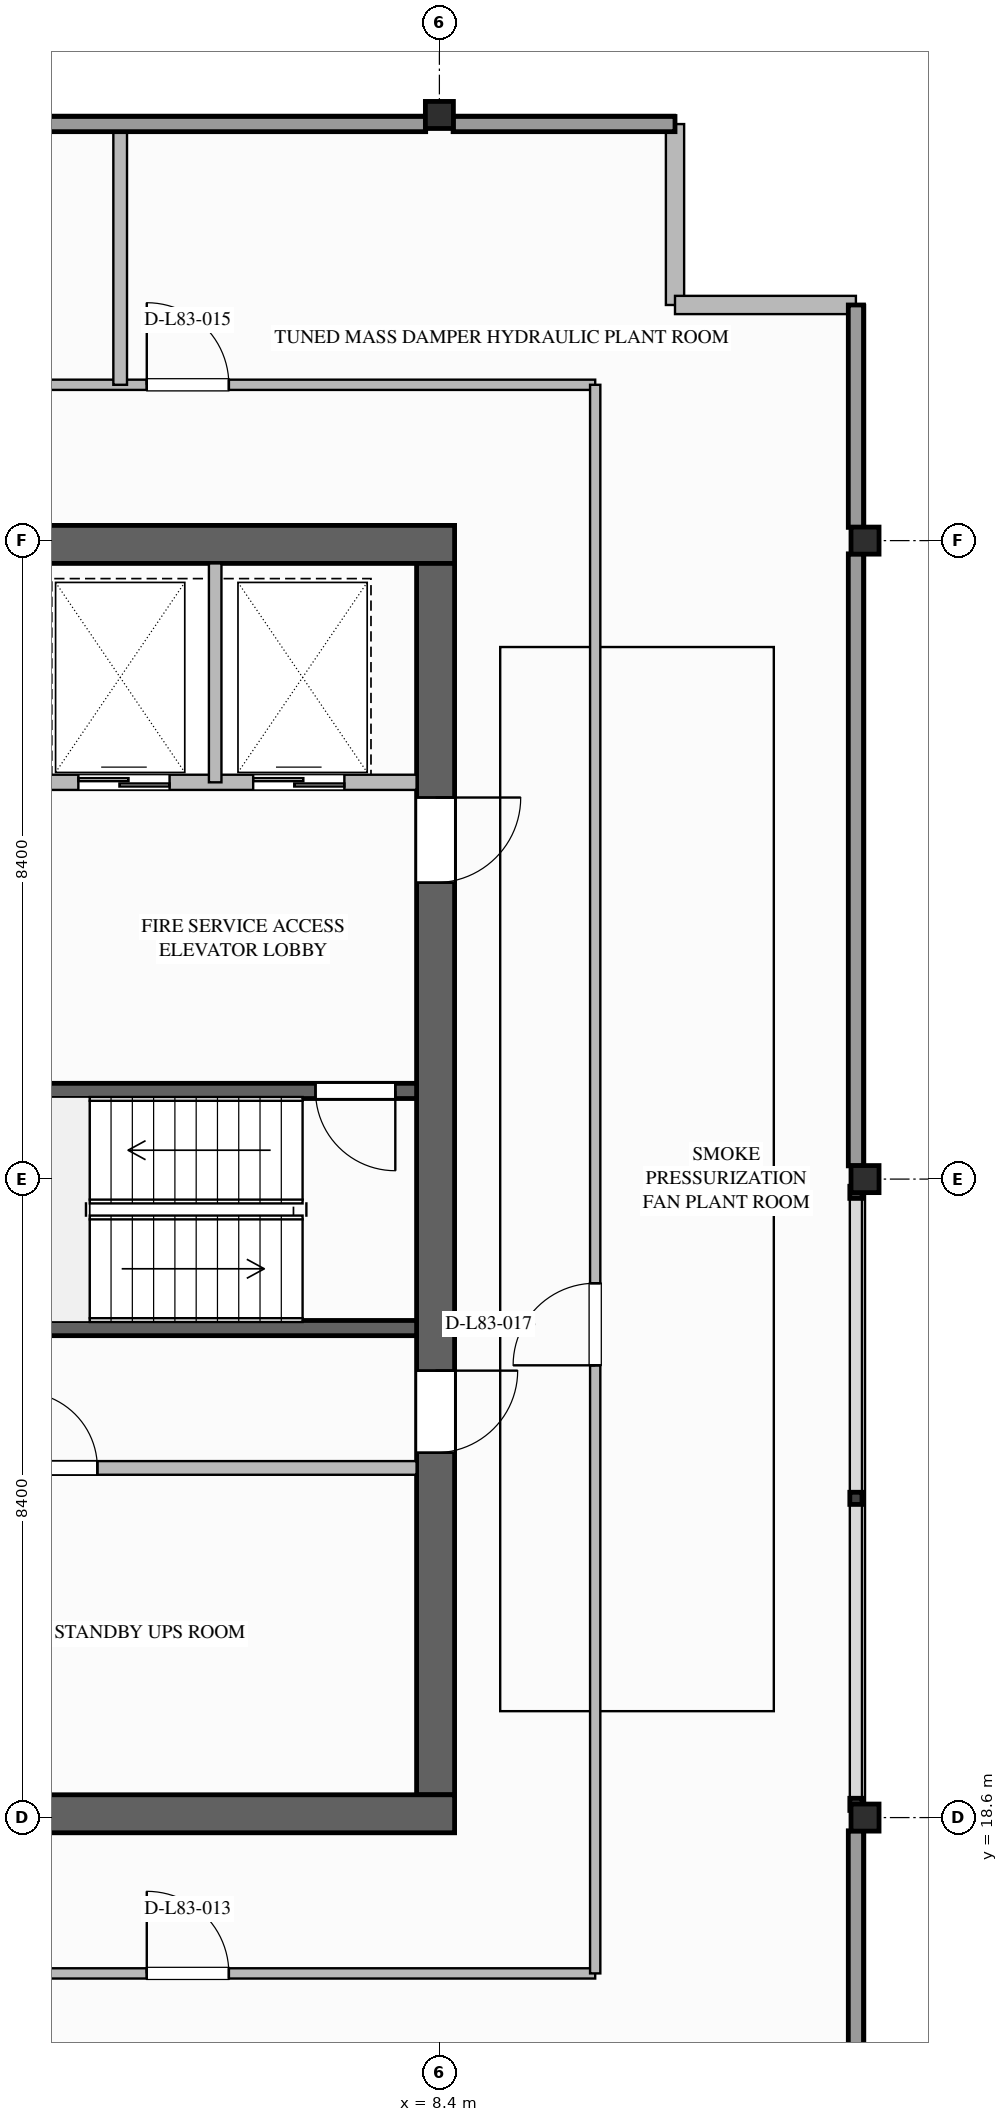
"""IFC4 building model, lengths in metres.
Left out: names, types, materials, properties, quantities, classifications, styles, units other than length and angle.
Written with IfcOpenShell. Run it as: python <this file> out.ifc"""

import sys

from ifc_helpers import new_model, si_unit, direction, frame, frame_2d, origin, origin_2d, place, context, subcontext, project, spatial, rectangle, i_section, extrude, element, fill, save


model = new_model("IFC4")
c1 = context("Model", 3, precision=1e-05, world=origin(), true_north=direction((0.0, 1.0)))
c2 = subcontext(c1, "Body", "Model", "MODEL_VIEW")
j1 = project(units=[si_unit("LENGTHUNIT", "METRE"), si_unit("PLANEANGLEUNIT", "RADIAN")], contexts=[c1])
p1 = place(None, origin())
s1 = spatial("IfcSite", under=j1, at=p1, CompositionType="ELEMENT")
p2 = place(p1, origin())
s2 = spatial("IfcBuilding", under=s1, at=p2, CompositionType="ELEMENT")
p3 = place(p2, frame((0.0, 0.0, 319.4)))
s3 = spatial("IfcBuildingStorey", under=s2, at=p3, CompositionType="ELEMENT", Elevation=319.4)
p4 = place(p3, frame((-8.6, 35.35, 0.0), z_axis=(0.0, 0.0, 1.0), x_axis=(1.0, 0.0, 0.0)))
e1 = element("IfcWall", 1, at=p4, inside=s3, PredefinedType="SHEAR", context=c2, shape_type="SweptSolid", body=[
    extrude(rectangle(XDim=17.2, YDim=0.5, at=frame_2d((8.6, 0.0))), origin(), (0.0, 0.0, 1.0), 3.8),
])
p5 = place(p3, frame((8.35, 35.1, 0.0), z_axis=(0.0, 0.0, 1.0), x_axis=(0.0, -1.0, 0.0)))
e2 = element("IfcWall", 2, at=p5, inside=s3, PredefinedType="SHEAR", context=c2, shape_type="SweptSolid", body=[
    extrude(rectangle(XDim=16.2, YDim=0.5, at=frame_2d((8.1, 0.0))), origin(), (0.0, 0.0, 1.0), 3.8),
])
p6 = place(p5, frame((3.08, 0.0, 0.0)))
e3 = element("IfcOpeningElement", 3, at=p6, cuts=e2, PredefinedType="OPENING", context=c2, shape_type="SweptSolid", body=[
    extrude(rectangle(XDim=1.12, YDim=2.1, at=frame_2d((0.56, 1.05))), frame((0.0, 0.26, 0.0), z_axis=(0.0, -1.0, 0.0), x_axis=(1.0, 0.0, 0.0)), (0.0, 0.0, 1.0), 0.52),
])
p7 = place(p5, frame((10.62, 0.0, 0.0)))
e4 = element("IfcOpeningElement", 4, at=p7, cuts=e2, PredefinedType="OPENING", context=c2, shape_type="SweptSolid", body=[
    extrude(rectangle(XDim=1.08, YDim=2.04, at=frame_2d((0.54, 1.02))), frame((0.0, 0.26, 0.0), z_axis=(0.0, -1.0, 0.0), x_axis=(1.0, 0.0, 0.0)), (0.0, 0.0, 1.0), 0.52),
])
p8 = place(p3, frame((8.6, 18.65, 0.0), z_axis=(0.0, 0.0, 1.0), x_axis=(-1.0, 0.0, 0.0)))
e5 = element("IfcWall", 5, at=p8, inside=s3, PredefinedType="SHEAR", context=c2, shape_type="SweptSolid", body=[
    extrude(rectangle(XDim=17.2, YDim=0.5, at=frame_2d((8.6, 0.0))), origin(), (0.0, 0.0, 1.0), 3.8),
])
for number, where, z_axis, x_axis in (
    (6, (14.0, 18.6, 0.0), (0.0, 0.0, 1.0), (1.0, 0.0, 0.0)),
    (7, (14.0, 27.0, 0.0), (0.0, 0.0, 1.0), (1.0, 0.0, 0.0)),
    (8, (14.0, 35.4, 0.0), (0.0, 0.0, 1.0), (1.0, 0.0, 0.0)),
    (9, (8.4, 41.0, 0.0), (0.0, 0.0, 1.0), (1.0, 0.0, 0.0)),
):
    element("IfcColumn", number, at=place(p3, frame(where, z_axis=z_axis, x_axis=x_axis)), inside=s3, PredefinedType="COLUMN", context=c2, shape_type="SweptSolid", body=[
        extrude(i_section(OverallWidth=0.369, OverallDepth=0.356, WebThickness=0.011, FlangeThickness=0.018, FilletRadius=0.025, at=origin_2d()), origin(), (0.0, 0.0, 1.0), 3.797),
    ])
for number, where, z_axis, x_axis in (
    (10, (11.5, 40.88, 0.0), (0.0, 0.0, 1.0), (0.0, -1.0, 0.0)),
    (11, (11.5, 38.5, 0.0), (0.0, 0.0, 1.0), (1.0, 0.0, 0.0)),
):
    element("IfcWall", number, at=place(p3, frame(where, z_axis=z_axis, x_axis=x_axis)), inside=s3, PredefinedType="STANDARD", context=c2, shape_type="SweptSolid", body=[
        extrude(rectangle(XDim=2.38, YDim=0.24, at=frame_2d((1.19, 0.0))), origin(), (0.0, 0.0, 1.0), 3.48),
    ])
p9 = place(p3, frame((0.0, 25.04, 0.0), z_axis=(0.0, 0.0, 1.0), x_axis=(1.0, 0.0, 0.0)))
e12 = element("IfcWall", 12, at=p9, inside=s3, PredefinedType="SOLIDWALL", context=c2, shape_type="SweptSolid", body=[
    extrude(rectangle(XDim=8.1, YDim=0.2, at=frame_2d((4.05, 0.0))), origin(), (0.0, 0.0, 1.0), 3.48),
])
p10 = place(p3, frame((8.1, 28.16, 0.0), z_axis=(0.0, 0.0, 1.0), x_axis=(-1.0, 0.0, 0.0)))
e13 = element("IfcWall", 13, at=p10, inside=s3, PredefinedType="SOLIDWALL", context=c2, shape_type="SweptSolid", body=[
    extrude(rectangle(XDim=8.1, YDim=0.2, at=frame_2d((4.05, 0.0))), origin(), (0.0, 0.0, 1.0), 3.48),
])
p11 = place(p10, frame((0.28, 0.0, 0.0)))
e14 = element("IfcOpeningElement", 14, at=p11, cuts=e13, PredefinedType="OPENING", context=c2, shape_type="SweptSolid", body=[
    extrude(rectangle(XDim=1.05, YDim=2.1, at=frame_2d((0.525, 1.05))), frame((0.0, 0.11, 0.0), z_axis=(0.0, -1.0, 0.0), x_axis=(1.0, 0.0, 0.0)), (0.0, 0.0, 1.0), 0.22),
])
p12 = place(p3, frame((3.1, 32.22, 0.0), z_axis=(0.0, 0.0, 1.0), x_axis=(1.0, 0.0, 0.0)))
e15 = element("IfcWall", 15, at=p12, inside=s3, PredefinedType="SOLIDWALL", context=c2, shape_type="SweptSolid", body=[
    extrude(rectangle(XDim=5.0, YDim=0.2, at=frame_2d((2.5, 0.0))), origin(), (0.0, 0.0, 1.0), 3.48),
])
p13 = place(p12, frame((0.55, 0.0, 0.0)))
e16 = element("IfcOpeningElement", 16, at=p13, cuts=e15, PredefinedType="OPENING", context=c2, shape_type="SweptSolid", body=[
    extrude(rectangle(XDim=1.2, YDim=2.2, at=frame_2d((0.6, 1.1))), frame((0.0, 0.11, 0.0), z_axis=(0.0, -1.0, 0.0), x_axis=(1.0, 0.0, 0.0)), (0.0, 0.0, 1.0), 0.22),
])
p14 = place(p12, frame((2.85, 0.0, 0.0)))
e17 = element("IfcOpeningElement", 17, at=p14, cuts=e15, PredefinedType="OPENING", context=c2, shape_type="SweptSolid", body=[
    extrude(rectangle(XDim=1.2, YDim=2.2, at=frame_2d((0.6, 1.1))), frame((0.0, 0.11, 0.0), z_axis=(0.0, -1.0, 0.0), x_axis=(1.0, 0.0, 0.0)), (0.0, 0.0, 1.0), 0.22),
])
p15 = place(p3, frame((5.45, 32.22, 0.0), z_axis=(0.0, 0.0, 1.0), x_axis=(0.0, 1.0, 0.0)))
e18 = element("IfcWall", 18, at=p15, inside=s3, PredefinedType="PARTITIONING", context=c2, shape_type="SweptSolid", body=[
    extrude(rectangle(XDim=2.88, YDim=0.165, at=frame_2d((1.44, 0.0))), origin(), (0.0, 0.0, 1.0), 3.48),
])
p16 = place(p3, frame((-8.1, 23.2, 0.0), z_axis=(0.0, 0.0, 1.0), x_axis=(1.0, 0.0, 0.0)))
e19 = element("IfcWall", 19, at=p16, inside=s3, PredefinedType="SOLIDWALL", context=c2, shape_type="SweptSolid", body=[
    extrude(rectangle(XDim=16.2, YDim=0.18, at=frame_2d((8.1, 0.0))), origin(), (0.0, 0.0, 1.0), 3.48),
])
p17 = place(p16, frame((2.5, 0.0, 0.0)))
e20 = element("IfcOpeningElement", 20, at=p17, cuts=e19, PredefinedType="OPENING", context=c2, shape_type="SweptSolid", body=[
    extrude(rectangle(XDim=1.0, YDim=2.1, at=frame_2d((0.5, 1.05))), frame((0.0, 0.1, 0.0), z_axis=(0.0, -1.0, 0.0), x_axis=(1.0, 0.0, 0.0)), (0.0, 0.0, 1.0), 0.2),
])
p18 = place(p16, frame((11.0, 0.0, 0.0)))
e21 = element("IfcOpeningElement", 21, at=p18, cuts=e19, PredefinedType="OPENING", context=c2, shape_type="SweptSolid", body=[
    extrude(rectangle(XDim=1.0, YDim=2.1, at=frame_2d((0.5, 1.05))), frame((0.0, 0.1, 0.0), z_axis=(0.0, -1.0, 0.0), x_axis=(1.0, 0.0, 0.0)), (0.0, 0.0, 1.0), 0.2),
])
p19 = place(p3, frame((-10.45, 16.55, 0.0), z_axis=(0.0, 0.0, 1.0), x_axis=(1.0, 0.0, 0.0)))
e22 = element("IfcWall", 22, at=p19, inside=s3, PredefinedType="PARTITIONING", context=c2, shape_type="SweptSolid", body=[
    extrude(rectangle(XDim=20.9, YDim=0.135, at=frame_2d((10.45, 0.0))), origin(), (0.0, 0.0, 1.0), 3.48),
])
p20 = place(p19, frame((3.0, 0.0, 0.0)))
e23 = element("IfcOpeningElement", 23, at=p20, cuts=e22, PredefinedType="OPENING", context=c2, shape_type="SweptSolid", body=[
    extrude(rectangle(XDim=1.08, YDim=2.04, at=frame_2d((0.54, 1.02))), frame((0.0, 0.077, 0.0), z_axis=(0.0, -1.0, 0.0), x_axis=(1.0, 0.0, 0.0)), (0.0, 0.0, 1.0), 0.155),
])
p21 = place(p19, frame((15.0, 0.0, 0.0)))
e24 = element("IfcOpeningElement", 24, at=p21, cuts=e22, PredefinedType="OPENING", context=c2, shape_type="SweptSolid", body=[
    extrude(rectangle(XDim=1.08, YDim=2.04, at=frame_2d((0.54, 1.02))), frame((0.0, 0.077, 0.0), z_axis=(0.0, -1.0, 0.0), x_axis=(1.0, 0.0, 0.0)), (0.0, 0.0, 1.0), 0.155),
])
p22 = place(p3, frame((-10.45, 37.45, 0.0), z_axis=(0.0, 0.0, 1.0), x_axis=(1.0, 0.0, 0.0)))
e25 = element("IfcWall", 25, at=p22, inside=s3, PredefinedType="PARTITIONING", context=c2, shape_type="SweptSolid", body=[
    extrude(rectangle(XDim=20.9, YDim=0.135, at=frame_2d((10.45, 0.0))), origin(), (0.0, 0.0, 1.0), 3.48),
])
p23 = place(p22, frame((3.0, 0.0, 0.0)))
e26 = element("IfcOpeningElement", 26, at=p23, cuts=e25, PredefinedType="OPENING", context=c2, shape_type="SweptSolid", body=[
    extrude(rectangle(XDim=1.08, YDim=2.04, at=frame_2d((0.54, 1.02))), frame((0.0, 0.077, 0.0), z_axis=(0.0, -1.0, 0.0), x_axis=(1.0, 0.0, 0.0)), (0.0, 0.0, 1.0), 0.155),
])
p24 = place(p22, frame((15.0, 0.0, 0.0)))
e27 = element("IfcOpeningElement", 27, at=p24, cuts=e25, PredefinedType="OPENING", context=c2, shape_type="SweptSolid", body=[
    extrude(rectangle(XDim=1.08, YDim=2.04, at=frame_2d((0.54, 1.02))), frame((0.0, 0.077, 0.0), z_axis=(0.0, -1.0, 0.0), x_axis=(1.0, 0.0, 0.0)), (0.0, 0.0, 1.0), 0.155),
])
p25 = place(p3, frame((10.45, 16.55, 0.0), z_axis=(0.0, 0.0, 1.0), x_axis=(0.0, 1.0, 0.0)))
e28 = element("IfcWall", 28, at=p25, inside=s3, PredefinedType="PARTITIONING", context=c2, shape_type="SweptSolid", body=[
    extrude(rectangle(XDim=20.9, YDim=0.135, at=frame_2d((10.45, 0.0))), origin(), (0.0, 0.0, 1.0), 3.48),
])
p26 = place(p25, frame((8.0, 0.0, 0.0)))
e29 = element("IfcOpeningElement", 29, at=p26, cuts=e28, PredefinedType="OPENING", context=c2, shape_type="SweptSolid", body=[
    extrude(rectangle(XDim=1.08, YDim=2.04, at=frame_2d((0.54, 1.02))), frame((0.0, 0.077, 0.0), z_axis=(0.0, -1.0, 0.0), x_axis=(1.0, 0.0, 0.0)), (0.0, 0.0, 1.0), 0.155),
])
p27 = place(p3, frame((4.2, 37.45, 0.0), z_axis=(0.0, 0.0, 1.0), x_axis=(0.0, 1.0, 0.0)))
e30 = element("IfcWall", 30, at=p27, inside=s3, PredefinedType="SOLIDWALL", context=c2, shape_type="SweptSolid", body=[
    extrude(rectangle(XDim=3.43, YDim=0.18, at=frame_2d((1.715, 0.0))), origin(), (0.0, 0.0, 1.0), 3.48),
])
p28 = place(p11, origin())
e31 = element("IfcDoor", 31, at=p28, inside=s3, OperationType="SINGLE_SWING_LEFT", PredefinedType="DOOR", context=c2, shape_type="SweptSolid", body=[
    extrude(rectangle(XDim=1.05, YDim=2.1, at=frame_2d((0.525, 1.05))), frame((0.0, 0.025, 0.0), z_axis=(0.0, -1.0, 0.0), x_axis=(1.0, 0.0, 0.0)), (0.0, 0.0, 1.0), 0.05),
])
fill(e14, e31)
p29 = place(p13, origin())
e32 = element("IfcDoor", 32, at=p29, inside=s3, OperationType="SLIDING_TO_LEFT", PredefinedType="DOOR", context=c2, shape_type="SweptSolid", body=[
    extrude(rectangle(XDim=1.2, YDim=2.2, at=frame_2d((0.6, 1.1))), frame((0.0, 0.025, 0.0), z_axis=(0.0, -1.0, 0.0), x_axis=(1.0, 0.0, 0.0)), (0.0, 0.0, 1.0), 0.05),
])
fill(e16, e32)
p30 = place(p14, origin())
e33 = element("IfcDoor", 33, at=p30, inside=s3, OperationType="SLIDING_TO_LEFT", PredefinedType="DOOR", context=c2, shape_type="SweptSolid", body=[
    extrude(rectangle(XDim=1.2, YDim=2.2, at=frame_2d((0.6, 1.1))), frame((0.0, 0.025, 0.0), z_axis=(0.0, -1.0, 0.0), x_axis=(1.0, 0.0, 0.0)), (0.0, 0.0, 1.0), 0.05),
])
fill(e17, e33)
p31 = place(p6, origin())
e34 = element("IfcDoor", 34, at=p31, inside=s3, OperationType="SINGLE_SWING_LEFT", PredefinedType="DOOR", context=c2, shape_type="SweptSolid", body=[
    extrude(rectangle(XDim=1.12, YDim=2.1, at=frame_2d((0.56, 1.05))), frame((0.0, 0.025, 0.0), z_axis=(0.0, -1.0, 0.0), x_axis=(1.0, 0.0, 0.0)), (0.0, 0.0, 1.0), 0.05),
])
fill(e3, e34)
p32 = place(p7, origin())
e35 = element("IfcDoor", 35, at=p32, inside=s3, OperationType="SINGLE_SWING_LEFT", PredefinedType="DOOR", context=c2, shape_type="SweptSolid", body=[
    extrude(rectangle(XDim=1.08, YDim=2.04, at=frame_2d((0.54, 1.02))), frame((0.0, 0.025, 0.0), z_axis=(0.0, -1.0, 0.0), x_axis=(1.0, 0.0, 0.0)), (0.0, 0.0, 1.0), 0.05),
])
fill(e4, e35)
p33 = place(p18, origin())
e36 = element("IfcDoor", 36, at=p33, inside=s3, OperationType="SINGLE_SWING_LEFT", PredefinedType="DOOR", context=c2, shape_type="SweptSolid", body=[
    extrude(rectangle(XDim=1.0, YDim=2.1, at=frame_2d((0.5, 1.05))), frame((0.0, 0.025, 0.0), z_axis=(0.0, -1.0, 0.0), x_axis=(1.0, 0.0, 0.0)), (0.0, 0.0, 1.0), 0.05),
])
fill(e21, e36)
p34 = place(p21, origin())
e37 = element("IfcDoor", 37, at=p34, inside=s3, OperationType="SINGLE_SWING_LEFT", PredefinedType="DOOR", context=c2, shape_type="SweptSolid", body=[
    extrude(rectangle(XDim=1.08, YDim=2.04, at=frame_2d((0.54, 1.02))), frame((0.0, 0.025, 0.0), z_axis=(0.0, -1.0, 0.0), x_axis=(1.0, 0.0, 0.0)), (0.0, 0.0, 1.0), 0.05),
])
fill(e24, e37)
p35 = place(p24, origin())
e38 = element("IfcDoor", 38, at=p35, inside=s3, OperationType="SINGLE_SWING_LEFT", PredefinedType="DOOR", context=c2, shape_type="SweptSolid", body=[
    extrude(rectangle(XDim=1.08, YDim=2.04, at=frame_2d((0.54, 1.02))), frame((0.0, 0.025, 0.0), z_axis=(0.0, -1.0, 0.0), x_axis=(1.0, 0.0, 0.0)), (0.0, 0.0, 1.0), 0.05),
])
fill(e27, e38)
p36 = place(p26, origin())
e39 = element("IfcDoor", 39, at=p36, inside=s3, OperationType="SINGLE_SWING_LEFT", PredefinedType="DOOR", context=c2, shape_type="SweptSolid", body=[
    extrude(rectangle(XDim=1.08, YDim=2.04, at=frame_2d((0.54, 1.02))), frame((0.0, 0.025, 0.0), z_axis=(0.0, -1.0, 0.0), x_axis=(1.0, 0.0, 0.0)), (0.0, 0.0, 1.0), 0.05),
])
fill(e29, e39)
save(model, sys.argv[1])
